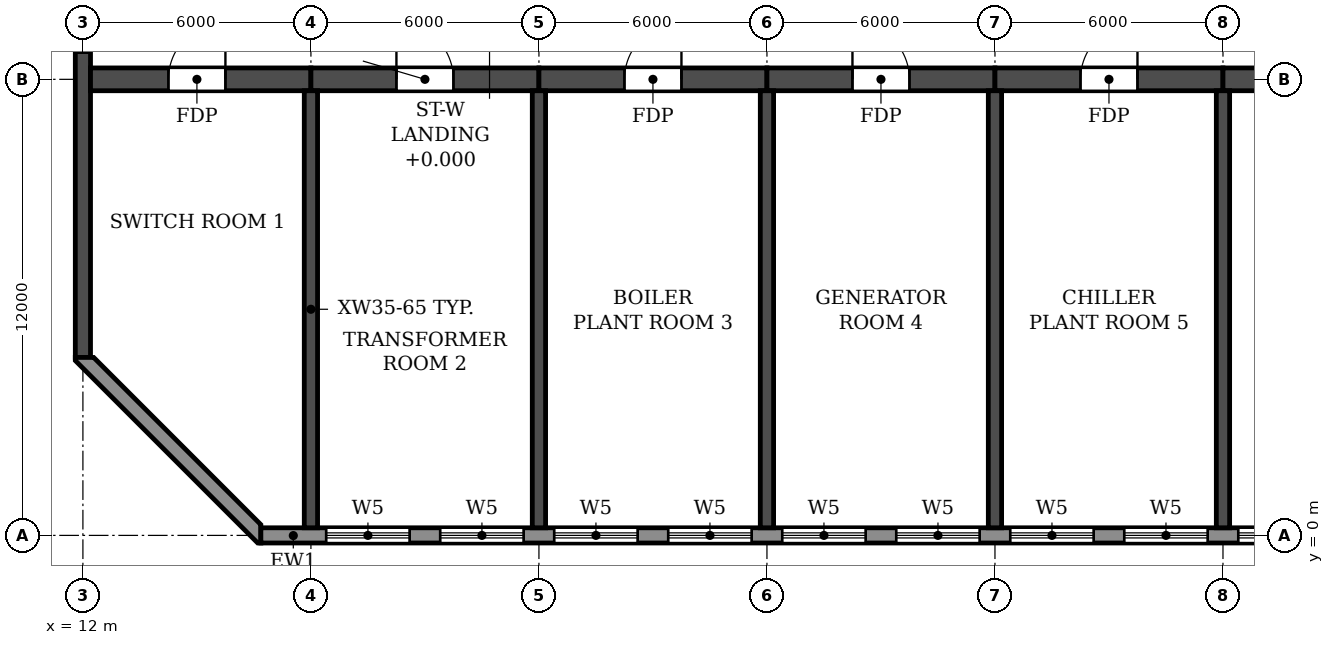
"""IFC4 building model, lengths in metres.
Left out: names, types, materials, properties, quantities, classifications, styles, units other than length and angle.
Written with IfcOpenShell. Run it as: python <this file> out.ifc"""

import sys

from ifc_helpers import new_model, si_unit, direction, frame, frame_2d, origin, place, context, subcontext, project, spatial, polyline, rectangle, outline, extrude, element, fill, save


model = new_model("IFC4")
c1 = context("Model", 3, precision=1e-05, world=origin(), true_north=direction((0.0, 1.0)))
c2 = subcontext(c1, "Body", "Model", "MODEL_VIEW")
j1 = project(units=[si_unit("LENGTHUNIT", "METRE"), si_unit("PLANEANGLEUNIT", "RADIAN")], contexts=[c1])
p1 = place(None, origin())
s1 = spatial("IfcSite", under=j1, at=p1, CompositionType="ELEMENT")
p2 = place(p1, origin())
s2 = spatial("IfcBuilding", under=s1, at=p2, CompositionType="ELEMENT")
p3 = place(p2, frame((0.0, 0.0, 115.8)))
s3 = spatial("IfcBuildingStorey", under=s2, at=p3, CompositionType="ELEMENT", Elevation=115.8)
for number, where, z_axis, x_axis in (
    (1, (18.0, 0.2, 0.0), (0.0, 0.0, 1.0), (0.0, 1.0, 0.0)),
    (2, (24.0, 0.2, 0.0), (0.0, 0.0, 1.0), (0.0, 1.0, 0.0)),
    (3, (30.0, 0.2, 0.0), (0.0, 0.0, 1.0), (0.0, 1.0, 0.0)),
    (4, (36.0, 0.2, 0.0), (0.0, 0.0, 1.0), (0.0, 1.0, 0.0)),
    (5, (42.0, 0.2, 0.0), (0.0, 0.0, 1.0), (0.0, 1.0, 0.0)),
):
    element("IfcWall", number, at=place(p3, frame(where, z_axis=z_axis, x_axis=x_axis)), inside=s3, PredefinedType="SHEAR", context=c2, shape_type="SweptSolid", body=[
        extrude(rectangle(XDim=11.5, YDim=0.35, at=frame_2d((5.75, 0.0))), origin(), (0.0, 0.0, 1.0), 6.37),
    ])
p4 = place(p3, frame((12.0, 4.683, 0.0), z_axis=(0.0, 0.0, 1.0), x_axis=(0.0, 1.0, 0.0)))
e6 = element("IfcWall", 6, at=p4, inside=s3, PredefinedType="SHEAR", context=c2, shape_type="SweptSolid", body=[
    extrude(rectangle(XDim=34.234, YDim=0.4, at=frame_2d((17.117, 0.0))), origin(), (0.0, 0.0, 1.0), 6.37),
])
p5 = place(p4, frame((23.817, 0.0, 0.9)))
e7 = element("IfcOpeningElement", 7, at=p5, cuts=e6, PredefinedType="OPENING", context=c2, shape_type="SweptSolid", body=[
    extrude(rectangle(XDim=1.2, YDim=1.5, at=frame_2d((0.6, 0.75))), frame((0.0, 0.21, 0.0), z_axis=(0.0, -1.0, 0.0), x_axis=(1.0, 0.0, 0.0)), (0.0, 0.0, 1.0), 0.42),
])
p6 = place(p4, frame((8.017, 0.0, 0.9)))
e8 = element("IfcOpeningElement", 8, at=p6, cuts=e6, PredefinedType="OPENING", context=c2, shape_type="SweptSolid", body=[
    extrude(rectangle(XDim=1.2, YDim=1.5, at=frame_2d((0.6, 0.75))), frame((0.0, 0.21, 0.0), z_axis=(0.0, -1.0, 0.0), x_axis=(1.0, 0.0, 0.0)), (0.0, 0.0, 1.0), 0.42),
])
p7 = place(p4, frame((13.317, 0.0, 0.9)))
e9 = element("IfcOpeningElement", 9, at=p7, cuts=e6, PredefinedType="OPENING", context=c2, shape_type="SweptSolid", body=[
    extrude(rectangle(XDim=1.2, YDim=1.5, at=frame_2d((0.6, 0.75))), frame((0.0, 0.21, 0.0), z_axis=(0.0, -1.0, 0.0), x_axis=(1.0, 0.0, 0.0)), (0.0, 0.0, 1.0), 0.42),
])
p8 = place(p3, frame((12.2, 12.0, 0.0), z_axis=(0.0, 0.0, 1.0), x_axis=(1.0, 0.0, 0.0)))
e10 = element("IfcWall", 10, at=p8, inside=s3, PredefinedType="SHEAR", context=c2, shape_type="SweptSolid", body=[
    extrude(rectangle(XDim=5.8, YDim=0.6, at=frame_2d((2.9, 0.0))), origin(), (0.0, 0.0, 1.0), 6.37),
])
p9 = place(p8, frame((2.05, 0.0, 0.0)))
e11 = element("IfcOpeningElement", 11, at=p9, cuts=e10, PredefinedType="OPENING", context=c2, shape_type="SweptSolid", body=[
    extrude(rectangle(XDim=1.5, YDim=2.1, at=frame_2d((0.75, 1.05))), frame((0.0, 0.31, 0.0), z_axis=(0.0, -1.0, 0.0), x_axis=(1.0, 0.0, 0.0)), (0.0, 0.0, 1.0), 0.62),
])
p10 = place(p3, frame((18.0, 12.0, 0.0), z_axis=(0.0, 0.0, 1.0), x_axis=(1.0, 0.0, 0.0)))
e12 = element("IfcWall", 12, at=p10, inside=s3, PredefinedType="SHEAR", context=c2, shape_type="SweptSolid", body=[
    extrude(rectangle(XDim=6.0, YDim=0.6, at=frame_2d((3.0, 0.0))), origin(), (0.0, 0.0, 1.0), 6.37),
])
p11 = place(p10, frame((2.25, 0.0, 0.0)))
e13 = element("IfcOpeningElement", 13, at=p11, cuts=e12, PredefinedType="OPENING", context=c2, shape_type="SweptSolid", body=[
    extrude(rectangle(XDim=1.5, YDim=2.1, at=frame_2d((0.75, 1.05))), frame((0.0, 0.31, 0.0), z_axis=(0.0, -1.0, 0.0), x_axis=(1.0, 0.0, 0.0)), (0.0, 0.0, 1.0), 0.62),
])
p12 = place(p3, frame((24.0, 12.0, 0.0), z_axis=(0.0, 0.0, 1.0), x_axis=(1.0, 0.0, 0.0)))
e14 = element("IfcWall", 14, at=p12, inside=s3, PredefinedType="SHEAR", context=c2, shape_type="SweptSolid", body=[
    extrude(rectangle(XDim=6.0, YDim=0.6, at=frame_2d((3.0, 0.0))), origin(), (0.0, 0.0, 1.0), 6.37),
])
p13 = place(p12, frame((2.25, 0.0, 0.0)))
e15 = element("IfcOpeningElement", 15, at=p13, cuts=e14, PredefinedType="OPENING", context=c2, shape_type="SweptSolid", body=[
    extrude(rectangle(XDim=1.5, YDim=2.1, at=frame_2d((0.75, 1.05))), frame((0.0, 0.31, 0.0), z_axis=(0.0, -1.0, 0.0), x_axis=(1.0, 0.0, 0.0)), (0.0, 0.0, 1.0), 0.62),
])
p14 = place(p3, frame((30.0, 12.0, 0.0), z_axis=(0.0, 0.0, 1.0), x_axis=(1.0, 0.0, 0.0)))
e16 = element("IfcWall", 16, at=p14, inside=s3, PredefinedType="SHEAR", context=c2, shape_type="SweptSolid", body=[
    extrude(rectangle(XDim=6.0, YDim=0.6, at=frame_2d((3.0, 0.0))), origin(), (0.0, 0.0, 1.0), 6.37),
])
p15 = place(p14, frame((2.25, 0.0, 0.0)))
e17 = element("IfcOpeningElement", 17, at=p15, cuts=e16, PredefinedType="OPENING", context=c2, shape_type="SweptSolid", body=[
    extrude(rectangle(XDim=1.5, YDim=2.1, at=frame_2d((0.75, 1.05))), frame((0.0, 0.31, 0.0), z_axis=(0.0, -1.0, 0.0), x_axis=(1.0, 0.0, 0.0)), (0.0, 0.0, 1.0), 0.62),
])
p16 = place(p3, frame((36.0, 12.0, 0.0), z_axis=(0.0, 0.0, 1.0), x_axis=(1.0, 0.0, 0.0)))
e18 = element("IfcWall", 18, at=p16, inside=s3, PredefinedType="SHEAR", context=c2, shape_type="SweptSolid", body=[
    extrude(rectangle(XDim=6.0, YDim=0.6, at=frame_2d((3.0, 0.0))), origin(), (0.0, 0.0, 1.0), 6.37),
])
p17 = place(p16, frame((2.25, 0.0, 0.0)))
e19 = element("IfcOpeningElement", 19, at=p17, cuts=e18, PredefinedType="OPENING", context=c2, shape_type="SweptSolid", body=[
    extrude(rectangle(XDim=1.5, YDim=2.1, at=frame_2d((0.75, 1.05))), frame((0.0, 0.31, 0.0), z_axis=(0.0, -1.0, 0.0), x_axis=(1.0, 0.0, 0.0)), (0.0, 0.0, 1.0), 0.62),
])
p18 = place(p3, frame((42.0, 12.0, 0.0), z_axis=(0.0, 0.0, 1.0), x_axis=(1.0, 0.0, 0.0)))
e20 = element("IfcWall", 20, at=p18, inside=s3, PredefinedType="SHEAR", context=c2, shape_type="SweptSolid", body=[
    extrude(rectangle(XDim=6.0, YDim=0.6, at=frame_2d((3.0, 0.0))), origin(), (0.0, 0.0, 1.0), 6.37),
])
p19 = place(p18, frame((2.25, 0.0, 0.0)))
e21 = element("IfcOpeningElement", 21, at=p19, cuts=e20, PredefinedType="OPENING", context=c2, shape_type="SweptSolid", body=[
    extrude(rectangle(XDim=1.5, YDim=2.1, at=frame_2d((0.75, 1.05))), frame((0.0, 0.31, 0.0), z_axis=(0.0, -1.0, 0.0), x_axis=(1.0, 0.0, 0.0)), (0.0, 0.0, 1.0), 0.62),
])
p20 = place(p3, frame((16.683, 0.0, 0.0), z_axis=(0.0, 0.0, 1.0), x_axis=(1.0, 0.0, 0.0)))
e22 = element("IfcWall", 22, at=p20, inside=s3, PredefinedType="STANDARD", context=c2, shape_type="SweptSolid", body=[
    extrude(rectangle(XDim=68.634, YDim=0.4, at=frame_2d((34.317, 0.0))), origin(), (0.0, 0.0, 1.0), 6.37),
])
p21 = place(p20, frame((1.717, 0.0, 0.6)))
e23 = element("IfcOpeningElement", 23, at=p21, cuts=e22, PredefinedType="OPENING", context=c2, shape_type="SweptSolid", body=[
    extrude(rectangle(XDim=2.2, YDim=2.4, at=frame_2d((1.1, 1.2))), frame((0.0, 0.21, 0.0), z_axis=(0.0, -1.0, 0.0), x_axis=(1.0, 0.0, 0.0)), (0.0, 0.0, 1.0), 0.42),
])
p22 = place(p20, frame((4.717, 0.0, 0.6)))
e24 = element("IfcOpeningElement", 24, at=p22, cuts=e22, PredefinedType="OPENING", context=c2, shape_type="SweptSolid", body=[
    extrude(rectangle(XDim=2.2, YDim=2.4, at=frame_2d((1.1, 1.2))), frame((0.0, 0.21, 0.0), z_axis=(0.0, -1.0, 0.0), x_axis=(1.0, 0.0, 0.0)), (0.0, 0.0, 1.0), 0.42),
])
p23 = place(p20, frame((7.717, 0.0, 0.6)))
e25 = element("IfcOpeningElement", 25, at=p23, cuts=e22, PredefinedType="OPENING", context=c2, shape_type="SweptSolid", body=[
    extrude(rectangle(XDim=2.2, YDim=2.4, at=frame_2d((1.1, 1.2))), frame((0.0, 0.21, 0.0), z_axis=(0.0, -1.0, 0.0), x_axis=(1.0, 0.0, 0.0)), (0.0, 0.0, 1.0), 0.42),
])
p24 = place(p20, frame((10.717, 0.0, 0.6)))
e26 = element("IfcOpeningElement", 26, at=p24, cuts=e22, PredefinedType="OPENING", context=c2, shape_type="SweptSolid", body=[
    extrude(rectangle(XDim=2.2, YDim=2.4, at=frame_2d((1.1, 1.2))), frame((0.0, 0.21, 0.0), z_axis=(0.0, -1.0, 0.0), x_axis=(1.0, 0.0, 0.0)), (0.0, 0.0, 1.0), 0.42),
])
p25 = place(p20, frame((13.717, 0.0, 0.6)))
e27 = element("IfcOpeningElement", 27, at=p25, cuts=e22, PredefinedType="OPENING", context=c2, shape_type="SweptSolid", body=[
    extrude(rectangle(XDim=2.2, YDim=2.4, at=frame_2d((1.1, 1.2))), frame((0.0, 0.21, 0.0), z_axis=(0.0, -1.0, 0.0), x_axis=(1.0, 0.0, 0.0)), (0.0, 0.0, 1.0), 0.42),
])
p26 = place(p20, frame((16.717, 0.0, 0.6)))
e28 = element("IfcOpeningElement", 28, at=p26, cuts=e22, PredefinedType="OPENING", context=c2, shape_type="SweptSolid", body=[
    extrude(rectangle(XDim=2.2, YDim=2.4, at=frame_2d((1.1, 1.2))), frame((0.0, 0.21, 0.0), z_axis=(0.0, -1.0, 0.0), x_axis=(1.0, 0.0, 0.0)), (0.0, 0.0, 1.0), 0.42),
])
p27 = place(p20, frame((19.717, 0.0, 0.6)))
e29 = element("IfcOpeningElement", 29, at=p27, cuts=e22, PredefinedType="OPENING", context=c2, shape_type="SweptSolid", body=[
    extrude(rectangle(XDim=2.2, YDim=2.4, at=frame_2d((1.1, 1.2))), frame((0.0, 0.21, 0.0), z_axis=(0.0, -1.0, 0.0), x_axis=(1.0, 0.0, 0.0)), (0.0, 0.0, 1.0), 0.42),
])
p28 = place(p20, frame((22.717, 0.0, 0.6)))
e30 = element("IfcOpeningElement", 30, at=p28, cuts=e22, PredefinedType="OPENING", context=c2, shape_type="SweptSolid", body=[
    extrude(rectangle(XDim=2.2, YDim=2.4, at=frame_2d((1.1, 1.2))), frame((0.0, 0.21, 0.0), z_axis=(0.0, -1.0, 0.0), x_axis=(1.0, 0.0, 0.0)), (0.0, 0.0, 1.0), 0.42),
])
p29 = place(p20, frame((25.717, 0.0, 0.6)))
e31 = element("IfcOpeningElement", 31, at=p29, cuts=e22, PredefinedType="OPENING", context=c2, shape_type="SweptSolid", body=[
    extrude(rectangle(XDim=2.2, YDim=2.4, at=frame_2d((1.1, 1.2))), frame((0.0, 0.21, 0.0), z_axis=(0.0, -1.0, 0.0), x_axis=(1.0, 0.0, 0.0)), (0.0, 0.0, 1.0), 0.42),
])
p30 = place(p20, frame((28.717, 0.0, 0.6)))
e32 = element("IfcOpeningElement", 32, at=p30, cuts=e22, PredefinedType="OPENING", context=c2, shape_type="SweptSolid", body=[
    extrude(rectangle(XDim=2.2, YDim=2.4, at=frame_2d((1.1, 1.2))), frame((0.0, 0.21, 0.0), z_axis=(0.0, -1.0, 0.0), x_axis=(1.0, 0.0, 0.0)), (0.0, 0.0, 1.0), 0.42),
])
p31 = place(p20, frame((31.717, 0.0, 0.6)))
e33 = element("IfcOpeningElement", 33, at=p31, cuts=e22, PredefinedType="OPENING", context=c2, shape_type="SweptSolid", body=[
    extrude(rectangle(XDim=2.2, YDim=2.4, at=frame_2d((1.1, 1.2))), frame((0.0, 0.21, 0.0), z_axis=(0.0, -1.0, 0.0), x_axis=(1.0, 0.0, 0.0)), (0.0, 0.0, 1.0), 0.42),
])
p32 = place(p20, frame((34.717, 0.0, 0.6)))
e34 = element("IfcOpeningElement", 34, at=p32, cuts=e22, PredefinedType="OPENING", context=c2, shape_type="SweptSolid", body=[
    extrude(rectangle(XDim=2.2, YDim=2.4, at=frame_2d((1.1, 1.2))), frame((0.0, 0.21, 0.0), z_axis=(0.0, -1.0, 0.0), x_axis=(1.0, 0.0, 0.0)), (0.0, 0.0, 1.0), 0.42),
])
p33 = place(p20, frame((37.717, 0.0, 0.6)))
e35 = element("IfcOpeningElement", 35, at=p33, cuts=e22, PredefinedType="OPENING", context=c2, shape_type="SweptSolid", body=[
    extrude(rectangle(XDim=2.2, YDim=2.4, at=frame_2d((1.1, 1.2))), frame((0.0, 0.21, 0.0), z_axis=(0.0, -1.0, 0.0), x_axis=(1.0, 0.0, 0.0)), (0.0, 0.0, 1.0), 0.42),
])
p34 = place(p20, frame((40.717, 0.0, 0.6)))
e36 = element("IfcOpeningElement", 36, at=p34, cuts=e22, PredefinedType="OPENING", context=c2, shape_type="SweptSolid", body=[
    extrude(rectangle(XDim=2.2, YDim=2.4, at=frame_2d((1.1, 1.2))), frame((0.0, 0.21, 0.0), z_axis=(0.0, -1.0, 0.0), x_axis=(1.0, 0.0, 0.0)), (0.0, 0.0, 1.0), 0.42),
])
p35 = place(p20, frame((43.717, 0.0, 0.6)))
e37 = element("IfcOpeningElement", 37, at=p35, cuts=e22, PredefinedType="OPENING", context=c2, shape_type="SweptSolid", body=[
    extrude(rectangle(XDim=2.2, YDim=2.4, at=frame_2d((1.1, 1.2))), frame((0.0, 0.21, 0.0), z_axis=(0.0, -1.0, 0.0), x_axis=(1.0, 0.0, 0.0)), (0.0, 0.0, 1.0), 0.42),
])
p36 = place(p20, frame((46.717, 0.0, 0.6)))
e38 = element("IfcOpeningElement", 38, at=p36, cuts=e22, PredefinedType="OPENING", context=c2, shape_type="SweptSolid", body=[
    extrude(rectangle(XDim=2.2, YDim=2.4, at=frame_2d((1.1, 1.2))), frame((0.0, 0.21, 0.0), z_axis=(0.0, -1.0, 0.0), x_axis=(1.0, 0.0, 0.0)), (0.0, 0.0, 1.0), 0.42),
])
p37 = place(p20, frame((49.717, 0.0, 0.6)))
e39 = element("IfcOpeningElement", 39, at=p37, cuts=e22, PredefinedType="OPENING", context=c2, shape_type="SweptSolid", body=[
    extrude(rectangle(XDim=2.2, YDim=2.4, at=frame_2d((1.1, 1.2))), frame((0.0, 0.21, 0.0), z_axis=(0.0, -1.0, 0.0), x_axis=(1.0, 0.0, 0.0)), (0.0, 0.0, 1.0), 0.42),
])
p38 = place(p20, frame((52.717, 0.0, 0.6)))
e40 = element("IfcOpeningElement", 40, at=p38, cuts=e22, PredefinedType="OPENING", context=c2, shape_type="SweptSolid", body=[
    extrude(rectangle(XDim=2.2, YDim=2.4, at=frame_2d((1.1, 1.2))), frame((0.0, 0.21, 0.0), z_axis=(0.0, -1.0, 0.0), x_axis=(1.0, 0.0, 0.0)), (0.0, 0.0, 1.0), 0.42),
])
p39 = place(p20, frame((55.717, 0.0, 0.6)))
e41 = element("IfcOpeningElement", 41, at=p39, cuts=e22, PredefinedType="OPENING", context=c2, shape_type="SweptSolid", body=[
    extrude(rectangle(XDim=2.2, YDim=2.4, at=frame_2d((1.1, 1.2))), frame((0.0, 0.21, 0.0), z_axis=(0.0, -1.0, 0.0), x_axis=(1.0, 0.0, 0.0)), (0.0, 0.0, 1.0), 0.42),
])
p40 = place(p20, frame((58.717, 0.0, 0.6)))
e42 = element("IfcOpeningElement", 42, at=p40, cuts=e22, PredefinedType="OPENING", context=c2, shape_type="SweptSolid", body=[
    extrude(rectangle(XDim=2.2, YDim=2.4, at=frame_2d((1.1, 1.2))), frame((0.0, 0.21, 0.0), z_axis=(0.0, -1.0, 0.0), x_axis=(1.0, 0.0, 0.0)), (0.0, 0.0, 1.0), 0.42),
])
p41 = place(p20, frame((61.717, 0.0, 0.6)))
e43 = element("IfcOpeningElement", 43, at=p41, cuts=e22, PredefinedType="OPENING", context=c2, shape_type="SweptSolid", body=[
    extrude(rectangle(XDim=2.2, YDim=2.4, at=frame_2d((1.1, 1.2))), frame((0.0, 0.21, 0.0), z_axis=(0.0, -1.0, 0.0), x_axis=(1.0, 0.0, 0.0)), (0.0, 0.0, 1.0), 0.42),
])
p42 = place(p20, frame((64.717, 0.0, 0.6)))
e44 = element("IfcOpeningElement", 44, at=p42, cuts=e22, PredefinedType="OPENING", context=c2, shape_type="SweptSolid", body=[
    extrude(rectangle(XDim=2.2, YDim=2.4, at=frame_2d((1.1, 1.2))), frame((0.0, 0.21, 0.0), z_axis=(0.0, -1.0, 0.0), x_axis=(1.0, 0.0, 0.0)), (0.0, 0.0, 1.0), 0.42),
])
p43 = place(p3, origin())
e45 = element("IfcWall", 45, at=p43, inside=s3, PredefinedType="STANDARD", context=c2, shape_type="SweptSolid", body=[
    extrude(outline(polyline([(11.8, 4.683), (11.8, 4.6), (16.6, -0.2), (16.683, -0.2), (16.683, 0.283), (12.283, 4.683), (11.8, 4.683)])), origin(), (0.0, 0.0, 1.0), 6.37),
])
p44 = place(p21, origin())
e46 = element("IfcWindow", 46, at=p44, inside=s3, PartitioningType="TRIPLE_PANEL_HORIZONTAL", PredefinedType="WINDOW", context=c2, shape_type="SweptSolid", body=[
    extrude(rectangle(XDim=2.2, YDim=2.4, at=frame_2d((1.1, 1.2))), frame((0.0, 0.03, 0.0), z_axis=(0.0, -1.0, 0.0), x_axis=(1.0, 0.0, 0.0)), (0.0, 0.0, 1.0), 0.06),
])
fill(e23, e46)
p45 = place(p22, origin())
e47 = element("IfcWindow", 47, at=p45, inside=s3, PartitioningType="TRIPLE_PANEL_HORIZONTAL", PredefinedType="WINDOW", context=c2, shape_type="SweptSolid", body=[
    extrude(rectangle(XDim=2.2, YDim=2.4, at=frame_2d((1.1, 1.2))), frame((0.0, 0.03, 0.0), z_axis=(0.0, -1.0, 0.0), x_axis=(1.0, 0.0, 0.0)), (0.0, 0.0, 1.0), 0.06),
])
fill(e24, e47)
p46 = place(p23, origin())
e48 = element("IfcWindow", 48, at=p46, inside=s3, PartitioningType="TRIPLE_PANEL_HORIZONTAL", PredefinedType="WINDOW", context=c2, shape_type="SweptSolid", body=[
    extrude(rectangle(XDim=2.2, YDim=2.4, at=frame_2d((1.1, 1.2))), frame((0.0, 0.03, 0.0), z_axis=(0.0, -1.0, 0.0), x_axis=(1.0, 0.0, 0.0)), (0.0, 0.0, 1.0), 0.06),
])
fill(e25, e48)
p47 = place(p24, origin())
e49 = element("IfcWindow", 49, at=p47, inside=s3, PartitioningType="TRIPLE_PANEL_HORIZONTAL", PredefinedType="WINDOW", context=c2, shape_type="SweptSolid", body=[
    extrude(rectangle(XDim=2.2, YDim=2.4, at=frame_2d((1.1, 1.2))), frame((0.0, 0.03, 0.0), z_axis=(0.0, -1.0, 0.0), x_axis=(1.0, 0.0, 0.0)), (0.0, 0.0, 1.0), 0.06),
])
fill(e26, e49)
p48 = place(p25, origin())
e50 = element("IfcWindow", 50, at=p48, inside=s3, PartitioningType="TRIPLE_PANEL_HORIZONTAL", PredefinedType="WINDOW", context=c2, shape_type="SweptSolid", body=[
    extrude(rectangle(XDim=2.2, YDim=2.4, at=frame_2d((1.1, 1.2))), frame((0.0, 0.03, 0.0), z_axis=(0.0, -1.0, 0.0), x_axis=(1.0, 0.0, 0.0)), (0.0, 0.0, 1.0), 0.06),
])
fill(e27, e50)
p49 = place(p26, origin())
e51 = element("IfcWindow", 51, at=p49, inside=s3, PartitioningType="TRIPLE_PANEL_HORIZONTAL", PredefinedType="WINDOW", context=c2, shape_type="SweptSolid", body=[
    extrude(rectangle(XDim=2.2, YDim=2.4, at=frame_2d((1.1, 1.2))), frame((0.0, 0.03, 0.0), z_axis=(0.0, -1.0, 0.0), x_axis=(1.0, 0.0, 0.0)), (0.0, 0.0, 1.0), 0.06),
])
fill(e28, e51)
p50 = place(p27, origin())
e52 = element("IfcWindow", 52, at=p50, inside=s3, PartitioningType="TRIPLE_PANEL_HORIZONTAL", PredefinedType="WINDOW", context=c2, shape_type="SweptSolid", body=[
    extrude(rectangle(XDim=2.2, YDim=2.4, at=frame_2d((1.1, 1.2))), frame((0.0, 0.03, 0.0), z_axis=(0.0, -1.0, 0.0), x_axis=(1.0, 0.0, 0.0)), (0.0, 0.0, 1.0), 0.06),
])
fill(e29, e52)
p51 = place(p28, origin())
e53 = element("IfcWindow", 53, at=p51, inside=s3, PartitioningType="TRIPLE_PANEL_HORIZONTAL", PredefinedType="WINDOW", context=c2, shape_type="SweptSolid", body=[
    extrude(rectangle(XDim=2.2, YDim=2.4, at=frame_2d((1.1, 1.2))), frame((0.0, 0.03, 0.0), z_axis=(0.0, -1.0, 0.0), x_axis=(1.0, 0.0, 0.0)), (0.0, 0.0, 1.0), 0.06),
])
fill(e30, e53)
p52 = place(p29, origin())
e54 = element("IfcWindow", 54, at=p52, inside=s3, PartitioningType="TRIPLE_PANEL_HORIZONTAL", PredefinedType="WINDOW", context=c2, shape_type="SweptSolid", body=[
    extrude(rectangle(XDim=2.2, YDim=2.4, at=frame_2d((1.1, 1.2))), frame((0.0, 0.03, 0.0), z_axis=(0.0, -1.0, 0.0), x_axis=(1.0, 0.0, 0.0)), (0.0, 0.0, 1.0), 0.06),
])
fill(e31, e54)
p53 = place(p9, origin())
e55 = element("IfcDoor", 55, at=p53, inside=s3, OperationType="DOUBLE_DOOR_SINGLE_SWING", PredefinedType="DOOR", context=c2, shape_type="SweptSolid", body=[
    extrude(rectangle(XDim=1.5, YDim=2.1, at=frame_2d((0.75, 1.05))), frame((0.0, 0.025, 0.0), z_axis=(0.0, -1.0, 0.0), x_axis=(1.0, 0.0, 0.0)), (0.0, 0.0, 1.0), 0.05),
])
fill(e11, e55)
p54 = place(p11, origin())
e56 = element("IfcDoor", 56, at=p54, inside=s3, OperationType="DOUBLE_DOOR_SINGLE_SWING", PredefinedType="DOOR", context=c2, shape_type="SweptSolid", body=[
    extrude(rectangle(XDim=1.5, YDim=2.1, at=frame_2d((0.75, 1.05))), frame((0.0, 0.025, 0.0), z_axis=(0.0, -1.0, 0.0), x_axis=(1.0, 0.0, 0.0)), (0.0, 0.0, 1.0), 0.05),
])
fill(e13, e56)
p55 = place(p13, origin())
e57 = element("IfcDoor", 57, at=p55, inside=s3, OperationType="DOUBLE_DOOR_SINGLE_SWING", PredefinedType="DOOR", context=c2, shape_type="SweptSolid", body=[
    extrude(rectangle(XDim=1.5, YDim=2.1, at=frame_2d((0.75, 1.05))), frame((0.0, 0.025, 0.0), z_axis=(0.0, -1.0, 0.0), x_axis=(1.0, 0.0, 0.0)), (0.0, 0.0, 1.0), 0.05),
])
fill(e15, e57)
p56 = place(p15, origin())
e58 = element("IfcDoor", 58, at=p56, inside=s3, OperationType="DOUBLE_DOOR_SINGLE_SWING", PredefinedType="DOOR", context=c2, shape_type="SweptSolid", body=[
    extrude(rectangle(XDim=1.5, YDim=2.1, at=frame_2d((0.75, 1.05))), frame((0.0, 0.025, 0.0), z_axis=(0.0, -1.0, 0.0), x_axis=(1.0, 0.0, 0.0)), (0.0, 0.0, 1.0), 0.05),
])
fill(e17, e58)
p57 = place(p17, origin())
e59 = element("IfcDoor", 59, at=p57, inside=s3, OperationType="DOUBLE_DOOR_SINGLE_SWING", PredefinedType="DOOR", context=c2, shape_type="SweptSolid", body=[
    extrude(rectangle(XDim=1.5, YDim=2.1, at=frame_2d((0.75, 1.05))), frame((0.0, 0.025, 0.0), z_axis=(0.0, -1.0, 0.0), x_axis=(1.0, 0.0, 0.0)), (0.0, 0.0, 1.0), 0.05),
])
fill(e19, e59)
save(model, sys.argv[1])
